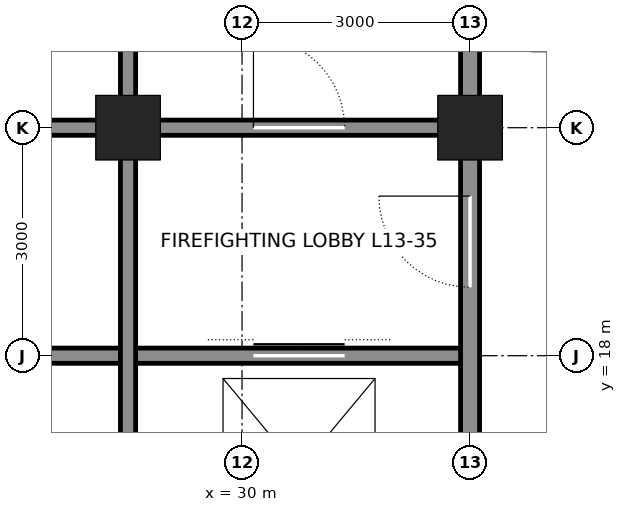
"""IFC4 building model, lengths in metres.
Left out: names, types, materials, properties, quantities, classifications, styles, units other than length and angle.
Written with IfcOpenShell. Run it as: python <this file> out.ifc"""

import sys

from ifc_helpers import new_model, si_unit, direction, frame, frame_2d, origin, origin_2d, place, context, subcontext, project, spatial, rectangle, hollow_rectangle, extrude, element, fill, save


model = new_model("IFC4")
c1 = context("Model", 3, precision=1e-05, world=origin(), true_north=direction((0.0, 1.0)))
c2 = subcontext(c1, "Body", "Model", "MODEL_VIEW")
j1 = project(units=[si_unit("LENGTHUNIT", "METRE"), si_unit("PLANEANGLEUNIT", "RADIAN")], contexts=[c1])
p1 = place(None, origin())
s1 = spatial("IfcSite", under=j1, at=p1, CompositionType="ELEMENT")
p2 = place(p1, origin())
s2 = spatial("IfcBuilding", under=s1, at=p2, CompositionType="ELEMENT")
p3 = place(p2, frame((0.0, 0.0, 64.8)))
s3 = spatial("IfcBuildingStorey", under=s2, at=p3, CompositionType="ELEMENT", Elevation=64.8)
for number, where, z_axis, x_axis in (
    (1, (33.0, 21.0, 0.0), (0.0, 0.0, 1.0), (1.0, 0.0, 0.0)),
    (2, (28.5, 21.0, 0.0), (0.0, 0.0, 1.0), (1.0, 0.0, 0.0)),
):
    element("IfcColumn", number, at=place(p3, frame(where, z_axis=z_axis, x_axis=x_axis)), inside=s3, PredefinedType="COLUMN", context=c2, shape_type="SweptSolid", body=[
        extrude(hollow_rectangle(XDim=0.85, YDim=0.85, WallThickness=0.085, at=origin_2d()), origin(), (0.0, 0.0, 1.0), 4.5),
    ])
p4 = place(p3, frame((25.5, 18.0, 0.0), z_axis=(0.0, 0.0, 1.0), x_axis=(1.0, 0.0, 0.0)))
e3 = element("IfcWall", 3, at=p4, inside=s3, PredefinedType="SOLIDWALL", context=c2, shape_type="SweptSolid", body=[
    extrude(rectangle(XDim=7.5, YDim=0.2, at=frame_2d((3.75, 0.0))), origin(), (0.0, 0.0, 1.0), 4.34),
])
p5 = place(p4, frame((4.65, 0.0, 0.0)))
e4 = element("IfcOpeningElement", 4, at=p5, cuts=e3, PredefinedType="OPENING", context=c2, shape_type="SweptSolid", body=[
    extrude(rectangle(XDim=1.2, YDim=2.1, at=frame_2d((0.6, 1.05))), frame((0.0, 0.11, 0.0), z_axis=(0.0, -1.0, 0.0), x_axis=(1.0, 0.0, 0.0)), (0.0, 0.0, 1.0), 0.22),
])
p6 = place(p3, frame((25.5, 21.0, 0.0), z_axis=(0.0, 0.0, 1.0), x_axis=(1.0, 0.0, 0.0)))
e5 = element("IfcWall", 5, at=p6, inside=s3, PredefinedType="SOLIDWALL", context=c2, shape_type="SweptSolid", body=[
    extrude(rectangle(XDim=2.75, YDim=0.2, at=frame_2d((1.375, 0.0))), origin(), (0.0, 0.0, 1.0), 3.39),
])
p7 = place(p3, frame((28.75, 21.0, 0.0), z_axis=(0.0, 0.0, 1.0), x_axis=(1.0, 0.0, 0.0)))
e6 = element("IfcWall", 6, at=p7, inside=s3, PredefinedType="SOLIDWALL", context=c2, shape_type="SweptSolid", body=[
    extrude(rectangle(XDim=4.0, YDim=0.2, at=frame_2d((2.0, 0.0))), origin(), (0.0, 0.0, 1.0), 3.39),
])
p8 = place(p7, frame((1.4, 0.0, 0.0)))
e7 = element("IfcOpeningElement", 7, at=p8, cuts=e6, PredefinedType="OPENING", context=c2, shape_type="SweptSolid", body=[
    extrude(rectangle(XDim=1.2, YDim=2.1, at=frame_2d((0.6, 1.05))), frame((0.0, 0.11, 0.0), z_axis=(0.0, -1.0, 0.0), x_axis=(1.0, 0.0, 0.0)), (0.0, 0.0, 1.0), 0.22),
])
p9 = place(p3, frame((28.5, 12.25, 0.0), z_axis=(0.0, 0.0, 1.0), x_axis=(0.0, 1.0, 0.0)))
e8 = element("IfcWall", 8, at=p9, inside=s3, PredefinedType="SOLIDWALL", context=c2, shape_type="SweptSolid", body=[
    extrude(rectangle(XDim=8.5, YDim=0.2, at=frame_2d((4.25, 0.0))), origin(), (0.0, 0.0, 1.0), 3.413),
])
p10 = place(p3, frame((28.5, 21.25, 0.0), z_axis=(0.0, 0.0, 1.0), x_axis=(0.0, 1.0, 0.0)))
e9 = element("IfcWall", 9, at=p10, inside=s3, PredefinedType="SOLIDWALL", context=c2, shape_type="SweptSolid", body=[
    extrude(rectangle(XDim=2.5, YDim=0.2, at=frame_2d((1.25, 0.0))), origin(), (0.0, 0.0, 1.0), 3.413),
])
p11 = place(p3, frame((33.0, 12.25, 0.0), z_axis=(0.0, 0.0, 1.0), x_axis=(0.0, 1.0, 0.0)))
e10 = element("IfcWall", 10, at=p11, inside=s3, PredefinedType="SOLIDWALL", context=c2, shape_type="SweptSolid", body=[
    extrude(rectangle(XDim=8.5, YDim=0.25, at=frame_2d((4.25, 0.0))), origin(), (0.0, 0.0, 1.0), 3.113),
])
p12 = place(p11, frame((6.65, 0.0, 0.0)))
e11 = element("IfcOpeningElement", 11, at=p12, cuts=e10, PredefinedType="OPENING", context=c2, shape_type="SweptSolid", body=[
    extrude(rectangle(XDim=1.2, YDim=2.1, at=frame_2d((0.6, 1.05))), frame((0.0, 0.135, 0.0), z_axis=(0.0, -1.0, 0.0), x_axis=(1.0, 0.0, 0.0)), (0.0, 0.0, 1.0), 0.27),
])
p13 = place(p11, frame((0.875, 0.0, 0.0)))
e12 = element("IfcOpeningElement", 12, at=p13, cuts=e10, PredefinedType="OPENING", context=c2, shape_type="SweptSolid", body=[
    extrude(rectangle(XDim=0.75, YDim=2.1, at=frame_2d((0.375, 1.05))), frame((0.0, 0.135, 0.0), z_axis=(0.0, -1.0, 0.0), x_axis=(1.0, 0.0, 0.0)), (0.0, 0.0, 1.0), 0.27),
])
p14 = place(p3, frame((33.0, 21.25, 0.0), z_axis=(0.0, 0.0, 1.0), x_axis=(0.0, 1.0, 0.0)))
e13 = element("IfcWall", 13, at=p14, inside=s3, PredefinedType="SOLIDWALL", context=c2, shape_type="SweptSolid", body=[
    extrude(rectangle(XDim=2.5, YDim=0.25, at=frame_2d((1.25, 0.0))), origin(), (0.0, 0.0, 1.0), 3.113),
])
p15 = place(p8, origin())
e14 = element("IfcDoor", 14, at=p15, inside=s3, OperationType="SINGLE_SWING_LEFT", PredefinedType="DOOR", context=c2, shape_type="SweptSolid", body=[
    extrude(rectangle(XDim=1.2, YDim=2.1, at=frame_2d((0.6, 1.05))), frame((0.0, 0.025, 0.0), z_axis=(0.0, -1.0, 0.0), x_axis=(1.0, 0.0, 0.0)), (0.0, 0.0, 1.0), 0.05),
])
fill(e7, e14)
p16 = place(p12, origin())
e15 = element("IfcDoor", 15, at=p16, inside=s3, OperationType="SINGLE_SWING_RIGHT", PredefinedType="DOOR", context=c2, shape_type="SweptSolid", body=[
    extrude(rectangle(XDim=1.2, YDim=2.1, at=frame_2d((0.6, 1.05))), frame((0.0, 0.025, 0.0), z_axis=(0.0, -1.0, 0.0), x_axis=(1.0, 0.0, 0.0)), (0.0, 0.0, 1.0), 0.05),
])
fill(e11, e15)
p17 = place(p5, origin())
e16 = element("IfcDoor", 16, at=p17, inside=s3, OperationType="DOUBLE_DOOR_SLIDING", PredefinedType="DOOR", context=c2, shape_type="SweptSolid", body=[
    extrude(rectangle(XDim=1.2, YDim=2.1, at=frame_2d((0.6, 1.05))), frame((0.0, 0.025, 0.0), z_axis=(0.0, -1.0, 0.0), x_axis=(1.0, 0.0, 0.0)), (0.0, 0.0, 1.0), 0.05),
])
fill(e4, e16)
save(model, sys.argv[1])
